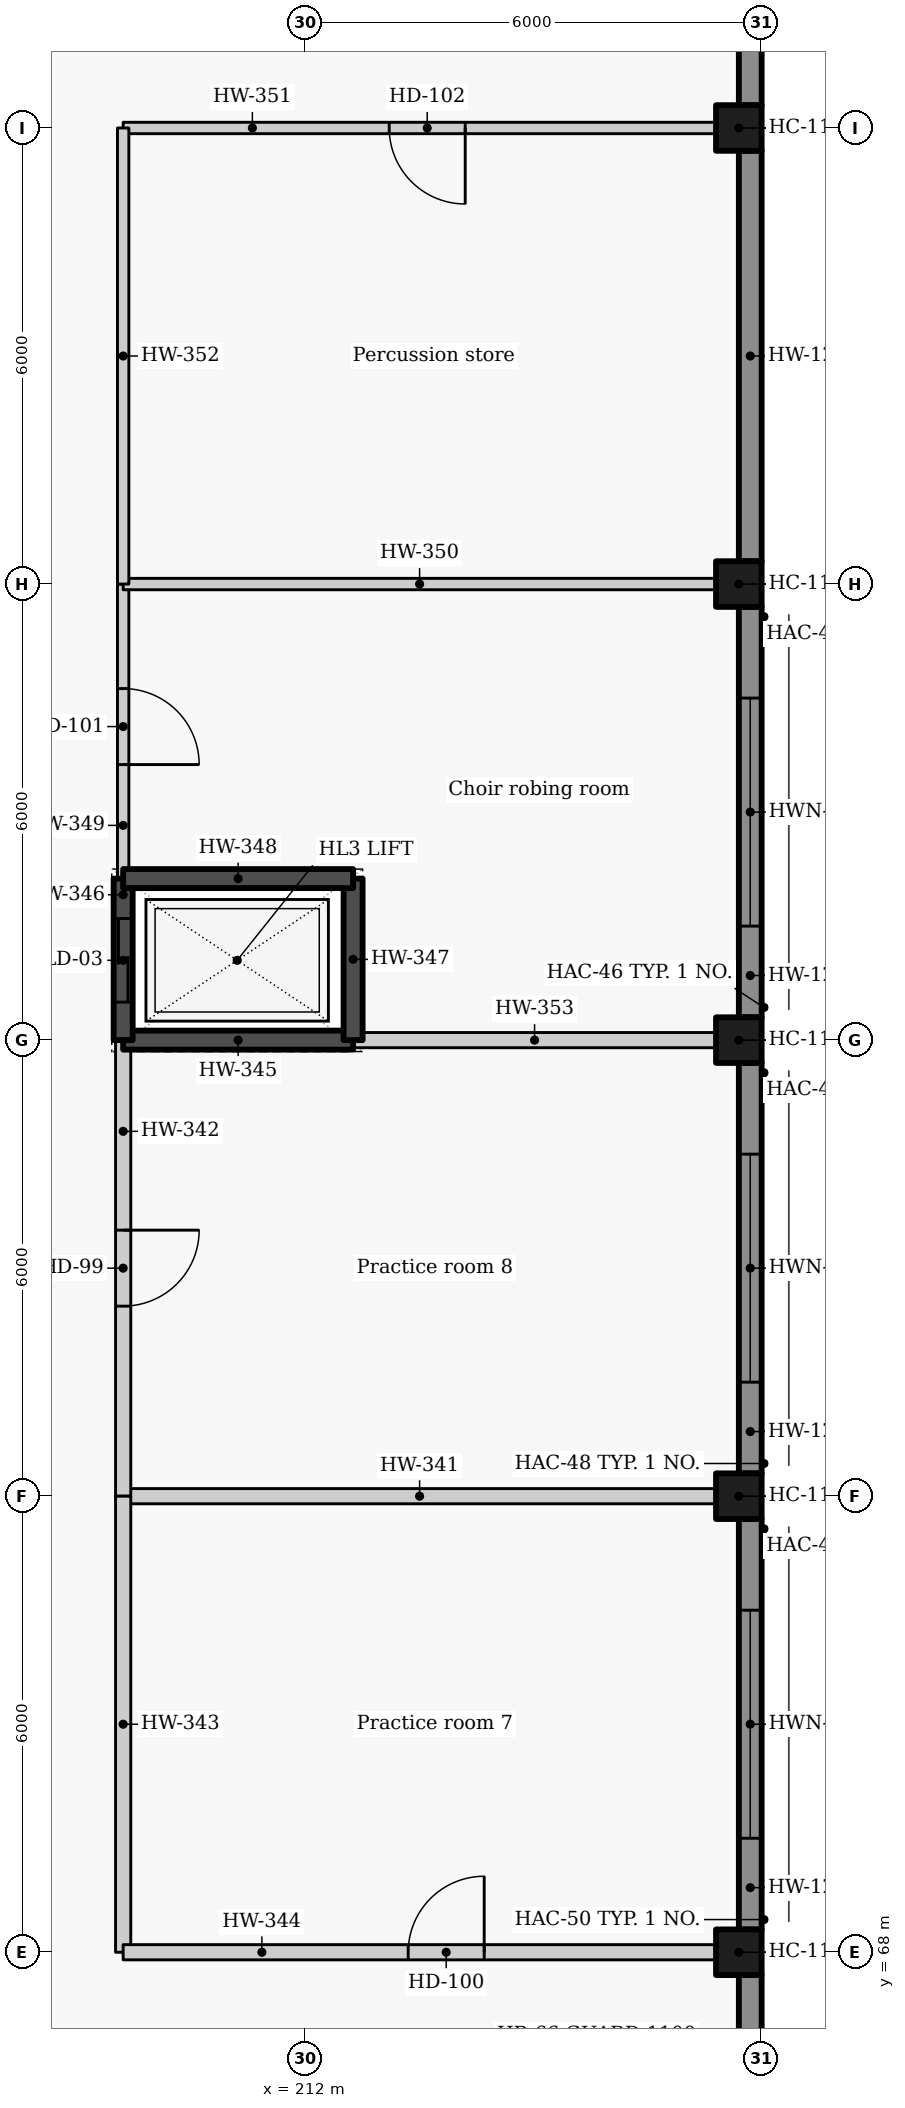
"""IFC4 building model, lengths in metres.
Left out: names, types, materials, properties, quantities, classifications, styles, units other than length and angle.
Written with IfcOpenShell. Run it as: python <this file> out.ifc"""

import sys

from ifc_helpers import new_model, si_unit, direction, frame, frame_2d, origin, origin_2d, place, context, subcontext, project, spatial, rectangle, extrude, element, fill, save


model = new_model("IFC4")
c1 = context("Model", 3, precision=1e-05, world=origin(), true_north=direction((0.0, 1.0)))
c2 = subcontext(c1, "Body", "Model", "MODEL_VIEW")
j1 = project(units=[si_unit("LENGTHUNIT", "METRE"), si_unit("PLANEANGLEUNIT", "RADIAN")], contexts=[c1])
p1 = place(None, origin())
s1 = spatial("IfcSite", under=j1, at=p1, CompositionType="ELEMENT")
p2 = place(p1, origin())
s2 = spatial("IfcBuilding", under=s1, at=p2, CompositionType="ELEMENT")
p3 = place(p2, frame((0.0, 0.0, 11.4)))
s3 = spatial("IfcBuildingStorey", under=s2, at=p3, CompositionType="ELEMENT", Elevation=11.4)
for number, where, z_axis, x_axis in (
    (1, (217.7, 68.0, 0.0), (0.0, 0.0, 1.0), (1.0, 0.0, 0.0)),
    (2, (217.7, 74.0, 0.0), (0.0, 0.0, 1.0), (1.0, 0.0, 0.0)),
    (3, (217.7, 80.0, 0.0), (0.0, 0.0, 1.0), (1.0, 0.0, 0.0)),
    (4, (217.7, 86.0, 0.0), (0.0, 0.0, 1.0), (1.0, 0.0, 0.0)),
    (5, (217.7, 92.0, 0.0), (0.0, 0.0, 1.0), (1.0, 0.0, 0.0)),
):
    element("IfcColumn", number, at=place(p3, frame(where, z_axis=z_axis, x_axis=x_axis)), inside=s3, PredefinedType="COLUMN", context=c2, shape_type="SweptSolid", body=[
        extrude(rectangle(XDim=0.6, YDim=0.6, at=origin_2d()), origin(), (0.0, 0.0, 1.0), 4.2),
    ])
p4 = place(p3, frame((217.85, 101.0, 0.0), z_axis=(0.0, 0.0, 1.0), x_axis=(0.0, -1.0, 0.0)))
e6 = element("IfcWall", 6, at=p4, inside=s3, PredefinedType="SOLIDWALL", context=c2, shape_type="SweptSolid", body=[
    extrude(rectangle(XDim=8.7, YDim=0.3, at=frame_2d((4.35, 0.0))), origin(), (0.0, 0.0, 1.0), 4.2),
])
p5 = place(p3, frame((217.85, 91.7, 0.0), z_axis=(0.0, 0.0, 1.0), x_axis=(0.0, -1.0, 0.0)))
e7 = element("IfcWall", 7, at=p5, inside=s3, PredefinedType="SOLIDWALL", context=c2, shape_type="SweptSolid", body=[
    extrude(rectangle(XDim=5.4, YDim=0.3, at=frame_2d((2.7, 0.0))), origin(), (0.0, 0.0, 1.0), 4.2),
])
p6 = place(p3, frame((217.85, 85.7, 0.0), z_axis=(0.0, 0.0, 1.0), x_axis=(0.0, -1.0, 0.0)))
e8 = element("IfcWall", 8, at=p6, inside=s3, PredefinedType="SOLIDWALL", context=c2, shape_type="SweptSolid", body=[
    extrude(rectangle(XDim=5.4, YDim=0.3, at=frame_2d((2.7, 0.0))), origin(), (0.0, 0.0, 1.0), 4.2),
])
p7 = place(p6, frame((1.2, 0.0, 0.9)))
e9 = element("IfcOpeningElement", 9, at=p7, cuts=e8, PredefinedType="OPENING", context=c2, shape_type="SweptSolid", body=[
    extrude(rectangle(XDim=3.0, YDim=1.8, at=frame_2d((1.5, 0.9))), frame((0.0, 0.16, 0.0), z_axis=(0.0, -1.0, 0.0), x_axis=(1.0, 0.0, 0.0)), (0.0, 0.0, 1.0), 0.32),
])
p8 = place(p3, frame((217.85, 79.7, 0.0), z_axis=(0.0, 0.0, 1.0), x_axis=(0.0, -1.0, 0.0)))
e10 = element("IfcWall", 10, at=p8, inside=s3, PredefinedType="SOLIDWALL", context=c2, shape_type="SweptSolid", body=[
    extrude(rectangle(XDim=5.4, YDim=0.3, at=frame_2d((2.7, 0.0))), origin(), (0.0, 0.0, 1.0), 4.2),
])
p9 = place(p8, frame((1.2, 0.0, 0.9)))
e11 = element("IfcOpeningElement", 11, at=p9, cuts=e10, PredefinedType="OPENING", context=c2, shape_type="SweptSolid", body=[
    extrude(rectangle(XDim=3.0, YDim=1.8, at=frame_2d((1.5, 0.9))), frame((0.0, 0.16, 0.0), z_axis=(0.0, -1.0, 0.0), x_axis=(1.0, 0.0, 0.0)), (0.0, 0.0, 1.0), 0.32),
])
p10 = place(p3, frame((217.85, 73.7, 0.0), z_axis=(0.0, 0.0, 1.0), x_axis=(0.0, -1.0, 0.0)))
e12 = element("IfcWall", 12, at=p10, inside=s3, PredefinedType="SOLIDWALL", context=c2, shape_type="SweptSolid", body=[
    extrude(rectangle(XDim=5.4, YDim=0.3, at=frame_2d((2.7, 0.0))), origin(), (0.0, 0.0, 1.0), 4.2),
])
p11 = place(p10, frame((1.2, 0.0, 0.9)))
e13 = element("IfcOpeningElement", 13, at=p11, cuts=e12, PredefinedType="OPENING", context=c2, shape_type="SweptSolid", body=[
    extrude(rectangle(XDim=3.0, YDim=1.8, at=frame_2d((1.5, 0.9))), frame((0.0, 0.16, 0.0), z_axis=(0.0, -1.0, 0.0), x_axis=(1.0, 0.0, 0.0)), (0.0, 0.0, 1.0), 0.32),
])
p12 = place(p3, frame((217.85, 67.7, 0.0), z_axis=(0.0, 0.0, 1.0), x_axis=(0.0, -1.0, 0.0)))
e14 = element("IfcWall", 14, at=p12, inside=s3, PredefinedType="SOLIDWALL", context=c2, shape_type="SweptSolid", body=[
    extrude(rectangle(XDim=8.7, YDim=0.3, at=frame_2d((4.35, 0.0))), origin(), (0.0, 0.0, 1.0), 4.2),
])
p13 = place(p3, frame((209.6, 74.0, 0.0), z_axis=(0.0, 0.0, 1.0), x_axis=(1.0, 0.0, 0.0)))
e15 = element("IfcWall", 15, at=p13, inside=s3, PredefinedType="PARTITIONING", context=c2, shape_type="SweptSolid", body=[
    extrude(rectangle(XDim=7.8, YDim=0.2, at=frame_2d((3.9, 0.0))), origin(), (0.0, 0.0, 1.0), 3.85),
])
p14 = place(p3, frame((209.6, 80.0, 0.0), z_axis=(0.0, 0.0, 1.0), x_axis=(0.0, -1.0, 0.0)))
e16 = element("IfcWall", 16, at=p14, inside=s3, PredefinedType="PARTITIONING", context=c2, shape_type="SweptSolid", body=[
    extrude(rectangle(XDim=6.0, YDim=0.2, at=frame_2d((3.0, 0.0))), origin(), (0.0, 0.0, 1.0), 3.85),
])
p15 = place(p14, frame((2.5, 0.0, 0.0)))
e17 = element("IfcOpeningElement", 17, at=p15, cuts=e16, PredefinedType="OPENING", context=c2, shape_type="SweptSolid", body=[
    extrude(rectangle(XDim=1.0, YDim=2.1, at=frame_2d((0.5, 1.05))), frame((0.0, 0.11, 0.0), z_axis=(0.0, -1.0, 0.0), x_axis=(1.0, 0.0, 0.0)), (0.0, 0.0, 1.0), 0.22),
])
p16 = place(p3, frame((209.6, 74.0, 0.0), z_axis=(0.0, 0.0, 1.0), x_axis=(0.0, -1.0, 0.0)))
e18 = element("IfcWall", 18, at=p16, inside=s3, PredefinedType="PARTITIONING", context=c2, shape_type="SweptSolid", body=[
    extrude(rectangle(XDim=6.0, YDim=0.2, at=frame_2d((3.0, 0.0))), origin(), (0.0, 0.0, 1.0), 3.85),
])
p17 = place(p3, frame((209.6, 68.0, 0.0), z_axis=(0.0, 0.0, 1.0), x_axis=(1.0, 0.0, 0.0)))
e19 = element("IfcWall", 19, at=p17, inside=s3, PredefinedType="PARTITIONING", context=c2, shape_type="SweptSolid", body=[
    extrude(rectangle(XDim=7.8, YDim=0.2, at=frame_2d((3.9, 0.0))), origin(), (0.0, 0.0, 1.0), 3.85),
])
p18 = place(p17, frame((3.75, 0.0, 0.0)))
e20 = element("IfcOpeningElement", 20, at=p18, cuts=e19, PredefinedType="OPENING", context=c2, shape_type="SweptSolid", body=[
    extrude(rectangle(XDim=1.0, YDim=2.1, at=frame_2d((0.5, 1.05))), frame((0.0, 0.11, 0.0), z_axis=(0.0, -1.0, 0.0), x_axis=(1.0, 0.0, 0.0)), (0.0, 0.0, 1.0), 0.22),
])
p19 = place(p3, frame((209.6, 80.0, 0.0), z_axis=(0.0, 0.0, 1.0), x_axis=(1.0, 0.0, 0.0)))
e21 = element("IfcWall", 21, at=p19, inside=s3, PredefinedType="SOLIDWALL", context=c2, shape_type="SweptSolid", body=[
    extrude(rectangle(XDim=3.025, YDim=0.25, at=frame_2d((1.512, 0.0))), origin(), (0.0, 0.0, 1.0), 4.2),
])
p20 = place(p3, frame((209.6, 82.125, 0.0), z_axis=(0.0, 0.0, 1.0), x_axis=(0.0, -1.0, 0.0)))
e22 = element("IfcWall", 22, at=p20, inside=s3, PredefinedType="SOLIDWALL", context=c2, shape_type="SweptSolid", body=[
    extrude(rectangle(XDim=2.125, YDim=0.25, at=frame_2d((1.062, 0.0))), origin(), (0.0, 0.0, 1.0), 4.2),
])
p21 = place(p20, frame((0.525, 0.0, 0.0)))
e23 = element("IfcOpeningElement", 23, at=p21, cuts=e22, PredefinedType="OPENING", context=c2, shape_type="SweptSolid", body=[
    extrude(rectangle(XDim=1.1, YDim=2.1, at=frame_2d((0.55, 1.05))), frame((0.0, 0.135, 0.0), z_axis=(0.0, -1.0, 0.0), x_axis=(1.0, 0.0, 0.0)), (0.0, 0.0, 1.0), 0.27),
])
p22 = place(p3, frame((212.625, 80.0, 0.0), z_axis=(0.0, 0.0, 1.0), x_axis=(0.0, 1.0, 0.0)))
e24 = element("IfcWall", 24, at=p22, inside=s3, PredefinedType="SOLIDWALL", context=c2, shape_type="SweptSolid", body=[
    extrude(rectangle(XDim=2.125, YDim=0.25, at=frame_2d((1.062, 0.0))), origin(), (0.0, 0.0, 1.0), 4.2),
])
p23 = place(p3, frame((212.625, 82.125, 0.0), z_axis=(0.0, 0.0, 1.0), x_axis=(-1.0, 0.0, 0.0)))
e25 = element("IfcWall", 25, at=p23, inside=s3, PredefinedType="SOLIDWALL", context=c2, shape_type="SweptSolid", body=[
    extrude(rectangle(XDim=3.025, YDim=0.25, at=frame_2d((1.512, 0.0))), origin(), (0.0, 0.0, 1.0), 4.2),
])
p24 = place(p3, frame((209.6, 86.0, 0.0), z_axis=(0.0, 0.0, 1.0), x_axis=(0.0, -1.0, 0.0)))
e26 = element("IfcWall", 26, at=p24, inside=s3, PredefinedType="PARTITIONING", context=c2, shape_type="SweptSolid", body=[
    extrude(rectangle(XDim=3.875, YDim=0.15, at=frame_2d((1.938, 0.0))), origin(), (0.0, 0.0, 1.0), 3.85),
])
p25 = place(p24, frame((1.375, 0.0, 0.0)))
e27 = element("IfcOpeningElement", 27, at=p25, cuts=e26, PredefinedType="OPENING", context=c2, shape_type="SweptSolid", body=[
    extrude(rectangle(XDim=1.0, YDim=2.1, at=frame_2d((0.5, 1.05))), frame((0.0, 0.085, 0.0), z_axis=(0.0, -1.0, 0.0), x_axis=(1.0, 0.0, 0.0)), (0.0, 0.0, 1.0), 0.17),
])
p26 = place(p3, frame((209.6, 86.0, 0.0), z_axis=(0.0, 0.0, 1.0), x_axis=(1.0, 0.0, 0.0)))
e28 = element("IfcWall", 28, at=p26, inside=s3, PredefinedType="PARTITIONING", context=c2, shape_type="SweptSolid", body=[
    extrude(rectangle(XDim=7.8, YDim=0.15, at=frame_2d((3.9, 0.0))), origin(), (0.0, 0.0, 1.0), 3.85),
])
p27 = place(p3, frame((217.4, 92.0, 0.0), z_axis=(0.0, 0.0, 1.0), x_axis=(-1.0, 0.0, 0.0)))
e29 = element("IfcWall", 29, at=p27, inside=s3, PredefinedType="PARTITIONING", context=c2, shape_type="SweptSolid", body=[
    extrude(rectangle(XDim=7.8, YDim=0.15, at=frame_2d((3.9, 0.0))), origin(), (0.0, 0.0, 1.0), 3.85),
])
p28 = place(p27, frame((3.3, 0.0, 0.0)))
e30 = element("IfcOpeningElement", 30, at=p28, cuts=e29, PredefinedType="OPENING", context=c2, shape_type="SweptSolid", body=[
    extrude(rectangle(XDim=1.0, YDim=2.1, at=frame_2d((0.5, 1.05))), frame((0.0, 0.085, 0.0), z_axis=(0.0, -1.0, 0.0), x_axis=(1.0, 0.0, 0.0)), (0.0, 0.0, 1.0), 0.17),
])
p29 = place(p3, frame((209.6, 92.0, 0.0), z_axis=(0.0, 0.0, 1.0), x_axis=(0.0, -1.0, 0.0)))
e31 = element("IfcWall", 31, at=p29, inside=s3, PredefinedType="PARTITIONING", context=c2, shape_type="SweptSolid", body=[
    extrude(rectangle(XDim=6.0, YDim=0.15, at=frame_2d((3.0, 0.0))), origin(), (0.0, 0.0, 1.0), 3.85),
])
p30 = place(p3, frame((212.625, 80.0, 0.0), z_axis=(0.0, 0.0, 1.0), x_axis=(1.0, 0.0, 0.0)))
e32 = element("IfcWall", 32, at=p30, inside=s3, PredefinedType="PARTITIONING", context=c2, shape_type="SweptSolid", body=[
    extrude(rectangle(XDim=4.775, YDim=0.2, at=frame_2d((2.387, 0.0))), origin(), (0.0, 0.0, 1.0), 3.85),
])
p31 = place(p7, origin())
e33 = element("IfcWindow", 33, at=p31, inside=s3, PartitioningType="SINGLE_PANEL", PredefinedType="WINDOW", context=c2, shape_type="SweptSolid", body=[
    extrude(rectangle(XDim=3.0, YDim=1.8, at=frame_2d((1.5, 0.9))), frame((0.0, 0.03, 0.0), z_axis=(0.0, -1.0, 0.0), x_axis=(1.0, 0.0, 0.0)), (0.0, 0.0, 1.0), 0.06),
])
fill(e9, e33)
p32 = place(p9, origin())
e34 = element("IfcWindow", 34, at=p32, inside=s3, PartitioningType="SINGLE_PANEL", PredefinedType="WINDOW", context=c2, shape_type="SweptSolid", body=[
    extrude(rectangle(XDim=3.0, YDim=1.8, at=frame_2d((1.5, 0.9))), frame((0.0, 0.03, 0.0), z_axis=(0.0, -1.0, 0.0), x_axis=(1.0, 0.0, 0.0)), (0.0, 0.0, 1.0), 0.06),
])
fill(e11, e34)
p33 = place(p11, origin())
e35 = element("IfcWindow", 35, at=p33, inside=s3, PartitioningType="SINGLE_PANEL", PredefinedType="WINDOW", context=c2, shape_type="SweptSolid", body=[
    extrude(rectangle(XDim=3.0, YDim=1.8, at=frame_2d((1.5, 0.9))), frame((0.0, 0.03, 0.0), z_axis=(0.0, -1.0, 0.0), x_axis=(1.0, 0.0, 0.0)), (0.0, 0.0, 1.0), 0.06),
])
fill(e13, e35)
p34 = place(p15, origin())
e36 = element("IfcDoor", 36, at=p34, inside=s3, OperationType="SINGLE_SWING_LEFT", PredefinedType="DOOR", context=c2, shape_type="SweptSolid", body=[
    extrude(rectangle(XDim=1.0, YDim=2.1, at=frame_2d((0.5, 1.05))), frame((0.0, 0.025, 0.0), z_axis=(0.0, -1.0, 0.0), x_axis=(1.0, 0.0, 0.0)), (0.0, 0.0, 1.0), 0.05),
])
fill(e17, e36)
p35 = place(p18, origin())
e37 = element("IfcDoor", 37, at=p35, inside=s3, OperationType="SINGLE_SWING_RIGHT", PredefinedType="DOOR", context=c2, shape_type="SweptSolid", body=[
    extrude(rectangle(XDim=1.0, YDim=2.1, at=frame_2d((0.5, 1.05))), frame((0.0, 0.025, 0.0), z_axis=(0.0, -1.0, 0.0), x_axis=(1.0, 0.0, 0.0)), (0.0, 0.0, 1.0), 0.05),
])
fill(e20, e37)
p36 = place(p21, origin())
e38 = element("IfcDoor", 38, at=p36, inside=s3, OperationType="SLIDING_TO_LEFT", PredefinedType="DOOR", context=c2, shape_type="SweptSolid", body=[
    extrude(rectangle(XDim=1.1, YDim=2.1, at=frame_2d((0.55, 1.05))), frame((0.0, 0.025, 0.0), z_axis=(0.0, -1.0, 0.0), x_axis=(1.0, 0.0, 0.0)), (0.0, 0.0, 1.0), 0.05),
])
fill(e23, e38)
p37 = place(p25, origin())
e39 = element("IfcDoor", 39, at=p37, inside=s3, OperationType="SINGLE_SWING_RIGHT", PredefinedType="DOOR", context=c2, shape_type="SweptSolid", body=[
    extrude(rectangle(XDim=1.0, YDim=2.1, at=frame_2d((0.5, 1.05))), frame((0.0, 0.025, 0.0), z_axis=(0.0, -1.0, 0.0), x_axis=(1.0, 0.0, 0.0)), (0.0, 0.0, 1.0), 0.05),
])
fill(e27, e39)
p38 = place(p28, origin())
e40 = element("IfcDoor", 40, at=p38, inside=s3, OperationType="SINGLE_SWING_LEFT", PredefinedType="DOOR", context=c2, shape_type="SweptSolid", body=[
    extrude(rectangle(XDim=1.0, YDim=2.1, at=frame_2d((0.5, 1.05))), frame((0.0, 0.025, 0.0), z_axis=(0.0, -1.0, 0.0), x_axis=(1.0, 0.0, 0.0)), (0.0, 0.0, 1.0), 0.05),
])
fill(e30, e40)
save(model, sys.argv[1])
